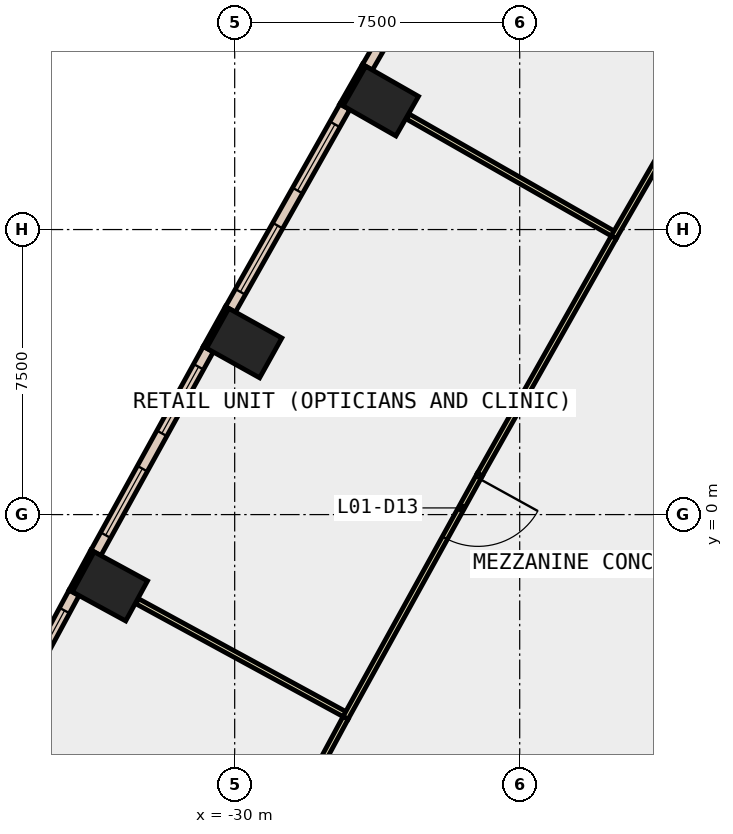
"""IFC4 building model, lengths in metres.
Left out: names, types, materials, properties, quantities, classifications, styles, units other than length and angle.
Written with IfcOpenShell. Run it as: python <this file> out.ifc"""

import sys

from ifc_helpers import new_model, si_unit, direction, frame, frame_2d, origin, origin_2d, place, context, subcontext, project, spatial, rectangle, extrude, element, fill, save


model = new_model("IFC4")
c1 = context("Model", 3, precision=1e-05, world=origin(), true_north=direction((0.0, 1.0)))
c2 = subcontext(c1, "Body", "Model", "MODEL_VIEW")
j1 = project(units=[si_unit("LENGTHUNIT", "METRE"), si_unit("PLANEANGLEUNIT", "RADIAN")], contexts=[c1])
p1 = place(None, origin())
s1 = spatial("IfcSite", under=j1, at=p1, CompositionType="ELEMENT")
p2 = place(p1, origin())
s2 = spatial("IfcBuilding", under=s1, at=p2, CompositionType="ELEMENT")
p3 = place(p2, frame((0.0, 0.0, 9.0)))
s3 = spatial("IfcBuildingStorey", under=s2, at=p3, CompositionType="ELEMENT", Elevation=9.0)
for number, where, z_axis, x_axis in (
    (1, (-26.155, 10.88, -0.45), (0.0, 0.0, 1.0), (0.496, 0.869, 0.0)),
    (2, (-29.75, 4.512, -0.45), (0.0, 0.0, 1.0), (0.487, 0.873, 0.0)),
    (3, (-33.283, -1.889, -0.45), (0.0, 0.0, 1.0), (0.478, 0.878, 0.0)),
):
    element("IfcColumn", number, at=place(p3, frame(where, z_axis=z_axis, x_axis=x_axis)), inside=s3, PredefinedType="COLUMN", context=c2, shape_type="SweptSolid", body=[
        extrude(rectangle(XDim=1.2, YDim=1.6, at=origin_2d()), origin(), (0.0, 0.0, 1.0), 6.0),
    ])
p4 = place(p3, frame((-26.596, 11.822, 0.0), z_axis=(0.0, 0.0, 1.0), x_axis=(-0.495854054996, -0.868405870629, 0.0)))
e4 = element("IfcWall", 4, at=p4, inside=s3, PredefinedType="STANDARD", context=c2, shape_type="SweptSolid", body=[
    extrude(rectangle(XDim=1.2, YDim=0.1, at=frame_2d((0.6, 0.0))), origin(), (0.0, 0.0, 1.0), 5.55),
])
p5 = place(p3, frame((-30.2, 5.45, 0.0), z_axis=(0.0, 0.0, 1.0), x_axis=(-0.486817526853, -0.873503689488, 0.0)))
e5 = element("IfcWall", 5, at=p5, inside=s3, PredefinedType="STANDARD", context=c2, shape_type="SweptSolid", body=[
    extrude(rectangle(XDim=1.2, YDim=0.1, at=frame_2d((0.6, 0.0))), origin(), (0.0, 0.0, 1.0), 5.55),
])
p6 = place(p3, frame((-33.742, -0.956, 0.0), z_axis=(0.0, 0.0, 1.0), x_axis=(-0.478267644701, -0.878214131082, 0.0)))
e6 = element("IfcWall", 6, at=p6, inside=s3, PredefinedType="STANDARD", context=c2, shape_type="SweptSolid", body=[
    extrude(rectangle(XDim=1.2, YDim=0.1, at=frame_2d((0.6, 0.0))), origin(), (0.0, 0.0, 1.0), 5.55),
])
p7 = place(p3, frame((-23.447, 17.071, 0.0), z_axis=(0.0, 0.0, 1.0), x_axis=(-0.499939977436, -0.866060055055, 0.0)))
e7 = element("IfcWall", 7, at=p7, inside=s3, PredefinedType="STANDARD", context=c2, shape_type="SweptSolid", body=[
    extrude(rectangle(XDim=6.121, YDim=0.3, at=frame_2d((3.061, 0.0))), origin(), (0.0, 0.0, 1.0), 5.55),
])
p8 = place(p7, frame((0.53, 0.0, 1.0)))
e8 = element("IfcOpeningElement", 8, at=p8, cuts=e7, PredefinedType="OPENING", context=c2, shape_type="SweptSolid", body=[
    extrude(rectangle(XDim=2.0, YDim=4.0, at=frame_2d((1.0, 2.0))), frame((0.0, 0.16, 0.0), z_axis=(0.0, -1.0, 0.0), x_axis=(1.0, 0.0, 0.0)), (0.0, 0.0, 1.0), 0.32),
])
p9 = place(p7, frame((3.591, 0.0, 1.0)))
e9 = element("IfcOpeningElement", 9, at=p9, cuts=e7, PredefinedType="OPENING", context=c2, shape_type="SweptSolid", body=[
    extrude(rectangle(XDim=2.0, YDim=4.0, at=frame_2d((1.0, 2.0))), frame((0.0, 0.16, 0.0), z_axis=(0.0, -1.0, 0.0), x_axis=(1.0, 0.0, 0.0)), (0.0, 0.0, 1.0), 0.32),
])
p10 = place(p3, frame((-27.101, 10.73, 0.0), z_axis=(0.0, 0.0, 1.0), x_axis=(-0.491661677717, -0.870786308267, 0.0)))
e10 = element("IfcWall", 10, at=p10, inside=s3, PredefinedType="STANDARD", context=c2, shape_type="SweptSolid", body=[
    extrude(rectangle(XDim=6.122, YDim=0.3, at=frame_2d((3.061, 0.0))), origin(), (0.0, 0.0, 1.0), 5.55),
])
p11 = place(p10, frame((0.531, 0.0, 1.0)))
e11 = element("IfcOpeningElement", 11, at=p11, cuts=e10, PredefinedType="OPENING", context=c2, shape_type="SweptSolid", body=[
    extrude(rectangle(XDim=2.0, YDim=4.0, at=frame_2d((1.0, 2.0))), frame((0.0, 0.16, 0.0), z_axis=(0.0, -1.0, 0.0), x_axis=(1.0, 0.0, 0.0)), (0.0, 0.0, 1.0), 0.32),
])
p12 = place(p10, frame((3.592, 0.0, 1.0)))
e12 = element("IfcOpeningElement", 12, at=p12, cuts=e10, PredefinedType="OPENING", context=c2, shape_type="SweptSolid", body=[
    extrude(rectangle(XDim=2.0, YDim=4.0, at=frame_2d((1.0, 2.0))), frame((0.0, 0.16, 0.0), z_axis=(0.0, -1.0, 0.0), x_axis=(1.0, 0.0, 0.0)), (0.0, 0.0, 1.0), 0.32),
])
p13 = place(p3, frame((-30.694, 4.353, 0.0), z_axis=(0.0, 0.0, 1.0), x_axis=(-0.483233380559, -0.875491576152, 0.0)))
e13 = element("IfcWall", 13, at=p13, inside=s3, PredefinedType="STANDARD", context=c2, shape_type="SweptSolid", body=[
    extrude(rectangle(XDim=6.121, YDim=0.3, at=frame_2d((3.061, 0.0))), origin(), (0.0, 0.0, 1.0), 5.55),
])
p14 = place(p13, frame((0.53, 0.0, 1.0)))
e14 = element("IfcOpeningElement", 14, at=p14, cuts=e13, PredefinedType="OPENING", context=c2, shape_type="SweptSolid", body=[
    extrude(rectangle(XDim=2.0, YDim=4.0, at=frame_2d((1.0, 2.0))), frame((0.0, 0.16, 0.0), z_axis=(0.0, -1.0, 0.0), x_axis=(1.0, 0.0, 0.0)), (0.0, 0.0, 1.0), 0.32),
])
p15 = place(p13, frame((3.591, 0.0, 1.0)))
e15 = element("IfcOpeningElement", 15, at=p15, cuts=e13, PredefinedType="OPENING", context=c2, shape_type="SweptSolid", body=[
    extrude(rectangle(XDim=2.0, YDim=4.0, at=frame_2d((1.0, 2.0))), frame((0.0, 0.16, 0.0), z_axis=(0.0, -1.0, 0.0), x_axis=(1.0, 0.0, 0.0)), (0.0, 0.0, 1.0), 0.32),
])
p16 = place(p3, frame((-34.226, -2.058, 0.0), z_axis=(0.0, 0.0, 1.0), x_axis=(-0.474584950749, -0.880209704856, 0.0)))
e16 = element("IfcWall", 16, at=p16, inside=s3, PredefinedType="STANDARD", context=c2, shape_type="SweptSolid", body=[
    extrude(rectangle(XDim=6.121, YDim=0.3, at=frame_2d((3.061, 0.0))), origin(), (0.0, 0.0, 1.0), 5.55),
])
p17 = place(p16, frame((0.53, 0.0, 1.0)))
e17 = element("IfcOpeningElement", 17, at=p17, cuts=e16, PredefinedType="OPENING", context=c2, shape_type="SweptSolid", body=[
    extrude(rectangle(XDim=2.0, YDim=4.0, at=frame_2d((1.0, 2.0))), frame((0.0, 0.16, 0.0), z_axis=(0.0, -1.0, 0.0), x_axis=(1.0, 0.0, 0.0)), (0.0, 0.0, 1.0), 0.32),
])
p18 = place(p16, frame((3.591, 0.0, 1.0)))
e18 = element("IfcOpeningElement", 18, at=p18, cuts=e16, PredefinedType="OPENING", context=c2, shape_type="SweptSolid", body=[
    extrude(rectangle(XDim=2.0, YDim=4.0, at=frame_2d((1.0, 2.0))), frame((0.0, 0.16, 0.0), z_axis=(0.0, -1.0, 0.0), x_axis=(1.0, 0.0, 0.0)), (0.0, 0.0, 1.0), 0.32),
])
p19 = place(p3, frame((-19.989, 7.361, 0.0), z_axis=(0.0, 0.0, 1.0), x_axis=(-0.868573128473, 0.495561015914, 0.0)))
e19 = element("IfcWall", 19, at=p19, inside=s3, PredefinedType="PARTITIONING", context=c2, shape_type="SweptSolid", body=[
    extrude(rectangle(XDim=6.279, YDim=0.15, at=frame_2d((3.14, 0.0))), origin(), (0.0, 0.0, 1.0), 5.55),
])
p20 = place(p3, frame((-16.368, 13.631, 0.0), z_axis=(0.0, 0.0, 1.0), x_axis=(-0.500158615396, -0.865933807774, 0.0)))
e20 = element("IfcWall", 20, at=p20, inside=s3, PredefinedType="PARTITIONING", context=c2, shape_type="SweptSolid", body=[
    extrude(rectangle(XDim=7.316, YDim=0.15, at=frame_2d((3.658, 0.0))), origin(), (0.0, 0.0, 1.0), 5.55),
])
p21 = place(p3, frame((-27.047, -5.284, 0.0), z_axis=(0.0, 0.0, 1.0), x_axis=(-0.878278583626, 0.478149275377, 0.0)))
e21 = element("IfcWall", 21, at=p21, inside=s3, PredefinedType="PARTITIONING", context=c2, shape_type="SweptSolid", body=[
    extrude(rectangle(XDim=6.28, YDim=0.15, at=frame_2d((3.14, 0.0))), origin(), (0.0, 0.0, 1.0), 5.55),
])
p22 = place(p3, frame((-20.025, 7.295, 0.0), z_axis=(0.0, 0.0, 1.0), x_axis=(-0.491633098341, -0.87080244408, 0.0)))
e22 = element("IfcWall", 22, at=p22, inside=s3, PredefinedType="PARTITIONING", context=c2, shape_type="SweptSolid", body=[
    extrude(rectangle(XDim=7.17, YDim=0.15, at=frame_2d((3.585, 0.0))), origin(), (0.0, 0.0, 1.0), 5.55),
])
p23 = place(p3, frame((-23.55, 1.051, 0.0), z_axis=(0.0, 0.0, 1.0), x_axis=(-0.48321416161, -0.875502183903, 0.0)))
e23 = element("IfcWall", 23, at=p23, inside=s3, PredefinedType="PARTITIONING", context=c2, shape_type="SweptSolid", body=[
    extrude(rectangle(XDim=7.311, YDim=0.15, at=frame_2d((3.656, 0.0))), origin(), (0.0, 0.0, 1.0), 5.55),
])
p24 = place(p23, frame((0.1, 0.0, 0.0)))
e24 = element("IfcOpeningElement", 24, at=p24, cuts=e23, PredefinedType="OPENING", context=c2, shape_type="SweptSolid", body=[
    extrude(rectangle(XDim=1.8, YDim=2.1, at=frame_2d((0.9, 1.05))), frame((0.0, 0.085, 0.0), z_axis=(0.0, -1.0, 0.0), x_axis=(1.0, 0.0, 0.0)), (0.0, 0.0, 1.0), 0.17),
])
p25 = place(p3, frame((-27.082, -5.35, 0.0), z_axis=(0.0, 0.0, 1.0), x_axis=(-0.474653615955, -0.880172679002, 0.0)))
e25 = element("IfcWall", 25, at=p25, inside=s3, PredefinedType="PARTITIONING", context=c2, shape_type="SweptSolid", body=[
    extrude(rectangle(XDim=7.176, YDim=0.15, at=frame_2d((3.588, 0.0))), origin(), (0.0, 0.0, 1.0), 5.55),
])
p26 = place(p25, frame((6.005, 0.0, 0.0)))
e26 = element("IfcOpeningElement", 26, at=p26, cuts=e25, PredefinedType="OPENING", context=c2, shape_type="SweptSolid", body=[
    extrude(rectangle(XDim=1.0, YDim=2.1, at=frame_2d((0.5, 1.05))), frame((0.0, 0.085, 0.0), z_axis=(0.0, -1.0, 0.0), x_axis=(1.0, 0.0, 0.0)), (0.0, 0.0, 1.0), 0.17),
])
p27 = place(p3, frame((-10.392, -3.5, 0.0), z_axis=(0.0, 0.0, 1.0), x_axis=(-0.866033409894, -0.499986132754, 0.0)))
e27 = element("IfcWall", 27, at=p27, inside=s3, PredefinedType="PARTITIONING", context=c2, shape_type="SweptSolid", body=[
    extrude(rectangle(XDim=21.8, YDim=0.15, at=frame_2d((10.9, 0.0))), origin(), (0.0, 0.0, 1.0), 5.55),
])
p28 = place(p27, frame((10.08, 0.0, 0.0)))
e28 = element("IfcOpeningElement", 28, at=p28, cuts=e27, PredefinedType="OPENING", context=c2, shape_type="SweptSolid", body=[
    extrude(rectangle(XDim=1.8, YDim=2.1, at=frame_2d((0.9, 1.05))), frame((0.0, 0.085, 0.0), z_axis=(0.0, -1.0, 0.0), x_axis=(1.0, 0.0, 0.0)), (0.0, 0.0, 1.0), 0.17),
])
p29 = place(p11, origin())
e29 = element("IfcWindow", 29, at=p29, inside=s3, PartitioningType="SINGLE_PANEL", PredefinedType="WINDOW", context=c2, shape_type="SweptSolid", body=[
    extrude(rectangle(XDim=2.0, YDim=4.0, at=frame_2d((1.0, 2.0))), frame((0.0, 0.03, 0.0), z_axis=(0.0, -1.0, 0.0), x_axis=(1.0, 0.0, 0.0)), (0.0, 0.0, 1.0), 0.06),
])
fill(e11, e29)
p30 = place(p12, origin())
e30 = element("IfcWindow", 30, at=p30, inside=s3, PartitioningType="SINGLE_PANEL", PredefinedType="WINDOW", context=c2, shape_type="SweptSolid", body=[
    extrude(rectangle(XDim=2.0, YDim=4.0, at=frame_2d((1.0, 2.0))), frame((0.0, 0.03, 0.0), z_axis=(0.0, -1.0, 0.0), x_axis=(1.0, 0.0, 0.0)), (0.0, 0.0, 1.0), 0.06),
])
fill(e12, e30)
p31 = place(p14, origin())
e31 = element("IfcWindow", 31, at=p31, inside=s3, PartitioningType="SINGLE_PANEL", PredefinedType="WINDOW", context=c2, shape_type="SweptSolid", body=[
    extrude(rectangle(XDim=2.0, YDim=4.0, at=frame_2d((1.0, 2.0))), frame((0.0, 0.03, 0.0), z_axis=(0.0, -1.0, 0.0), x_axis=(1.0, 0.0, 0.0)), (0.0, 0.0, 1.0), 0.06),
])
fill(e14, e31)
p32 = place(p15, origin())
e32 = element("IfcWindow", 32, at=p32, inside=s3, PartitioningType="SINGLE_PANEL", PredefinedType="WINDOW", context=c2, shape_type="SweptSolid", body=[
    extrude(rectangle(XDim=2.0, YDim=4.0, at=frame_2d((1.0, 2.0))), frame((0.0, 0.03, 0.0), z_axis=(0.0, -1.0, 0.0), x_axis=(1.0, 0.0, 0.0)), (0.0, 0.0, 1.0), 0.06),
])
fill(e15, e32)
p33 = place(p17, origin())
e33 = element("IfcWindow", 33, at=p33, inside=s3, PartitioningType="SINGLE_PANEL", PredefinedType="WINDOW", context=c2, shape_type="SweptSolid", body=[
    extrude(rectangle(XDim=2.0, YDim=4.0, at=frame_2d((1.0, 2.0))), frame((0.0, 0.03, 0.0), z_axis=(0.0, -1.0, 0.0), x_axis=(1.0, 0.0, 0.0)), (0.0, 0.0, 1.0), 0.06),
])
fill(e17, e33)
p34 = place(p24, origin())
e34 = element("IfcDoor", 34, at=p34, inside=s3, OperationType="DOUBLE_DOOR_SINGLE_SWING", PredefinedType="DOOR", context=c2, shape_type="SweptSolid", body=[
    extrude(rectangle(XDim=1.8, YDim=2.1, at=frame_2d((0.9, 1.05))), frame((0.0, 0.025, 0.0), z_axis=(0.0, -1.0, 0.0), x_axis=(1.0, 0.0, 0.0)), (0.0, 0.0, 1.0), 0.05),
])
fill(e24, e34)
save(model, sys.argv[1])
